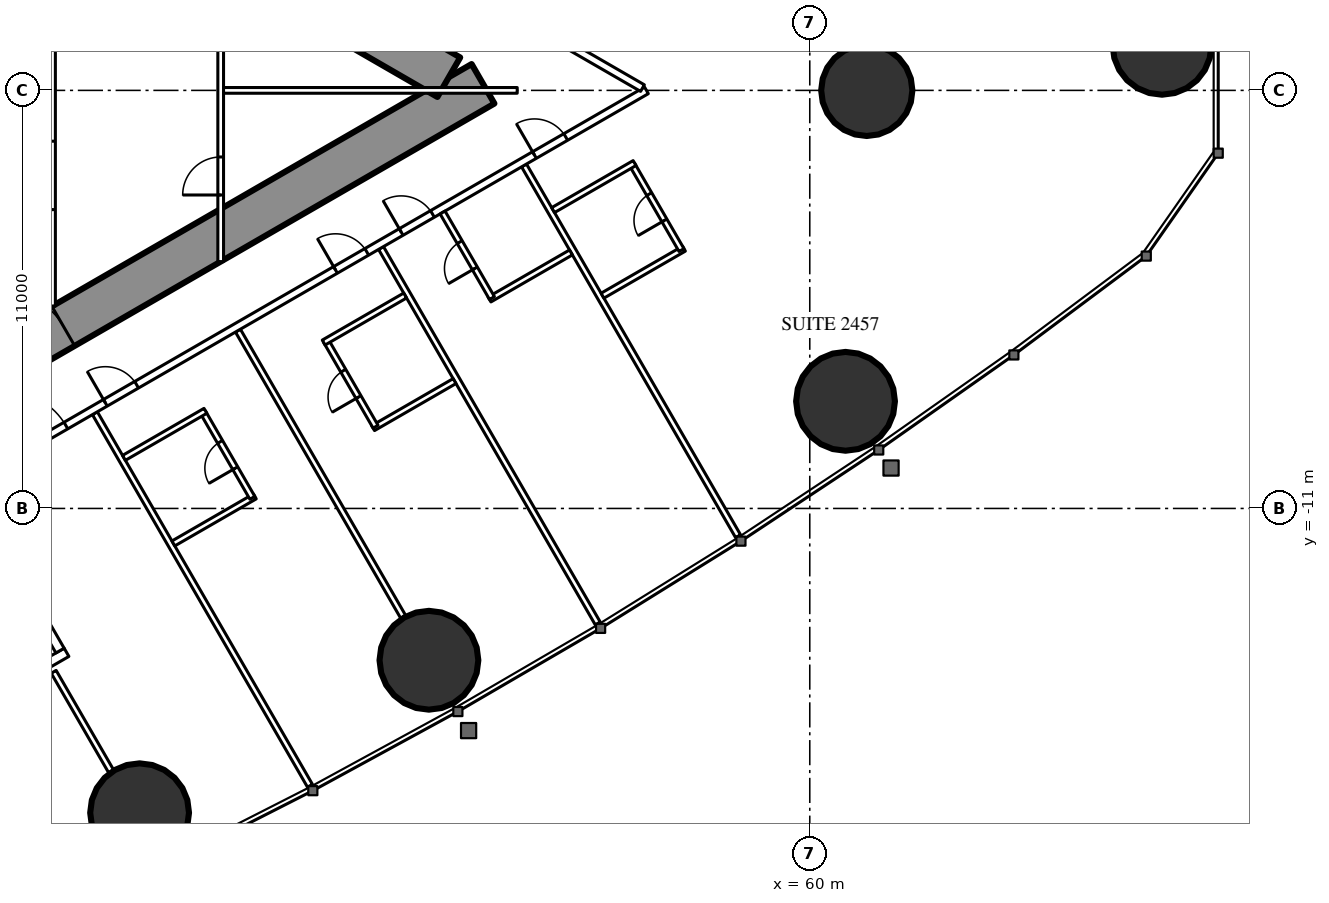
"""IFC4 building model, lengths in metres.
Left out: names, types, materials, properties, quantities, classifications, styles, units other than length and angle.
Written with IfcOpenShell. Run it as: python <this file> out.ifc"""

import sys

from ifc_helpers import new_model, si_unit, direction, frame, frame_2d, origin, origin_2d, place, context, subcontext, project, spatial, rectangle, circle, hollow_circle, extrude, element, fill, save


model = new_model("IFC4")
c1 = context("Model", 3, precision=1e-05, world=origin(), true_north=direction((0.0, 1.0)))
c2 = subcontext(c1, "Body", "Model", "MODEL_VIEW")
j1 = project(units=[si_unit("LENGTHUNIT", "METRE"), si_unit("PLANEANGLEUNIT", "RADIAN")], contexts=[c1])
p1 = place(None, origin())
s1 = spatial("IfcSite", under=j1, at=p1, CompositionType="ELEMENT")
p2 = place(p1, origin())
s2 = spatial("IfcBuilding", under=s1, at=p2, CompositionType="ELEMENT")
p3 = place(p2, frame((0.0, 0.0, 94.1)))
s3 = spatial("IfcBuildingStorey", under=s2, at=p3, CompositionType="ELEMENT", Elevation=94.1)
for number, where, z_axis, x_axis in (
    (1, (69.269, 1.187, 0.0), (0.0, 0.0, 1.0), (1.0, 0.0, 0.0)),
    (2, (42.366, -19.007, 0.0), (0.0, 0.0, 1.0), (1.0, 0.0, 0.0)),
    (3, (49.979, -14.994, 0.0), (0.0, 0.0, 1.0), (1.0, 0.0, 0.0)),
    (4, (60.941, -8.181, 0.0), (0.0, 0.0, 1.0), (1.0, 0.0, 0.0)),
):
    element("IfcColumn", number, at=place(p3, frame(where, z_axis=z_axis, x_axis=x_axis)), inside=s3, PredefinedType="COLUMN", context=c2, shape_type="SweptSolid", body=[
        extrude(hollow_circle(Radius=1.3, WallThickness=0.1, at=origin_2d()), origin(), (0.0, 0.0, 1.0), 3.5),
    ])
p4 = place(p3, frame((61.5, 0.0, 0.0), z_axis=(0.0, 0.0, 1.0), x_axis=(1.0, 0.0, 0.0)))
e5 = element("IfcColumn", 5, at=p4, inside=s3, PredefinedType="COLUMN", context=c2, shape_type="SweptSolid", body=[
    extrude(circle(Radius=1.2, at=origin_2d()), origin(), (0.0, 0.0, 1.0), 3.5),
])
p5 = place(p3, frame((27.2, -13.8, 0.0), z_axis=(0.0, 0.0, 1.0), x_axis=(0.866027159892, 0.499996958321, 0.0)))
e6 = element("IfcWall", 6, at=p5, inside=s3, PredefinedType="SHEAR", context=c2, shape_type="SweptSolid", body=[
    extrude(rectangle(XDim=27.947, YDim=1.2, at=frame_2d((13.973, 0.0))), origin(), (0.0, 0.0, 1.0), 3.5),
])
p6 = place(p5, frame((4.6, 0.0, 0.0)))
e7 = element("IfcOpeningElement", 7, at=p6, cuts=e6, PredefinedType="OPENING", context=c2, shape_type="SweptSolid", body=[
    extrude(rectangle(XDim=1.0, YDim=2.2, at=frame_2d((0.5, 1.1))), frame((0.0, 0.61, 0.0), z_axis=(0.0, -1.0, 0.0), x_axis=(1.0, 0.0, 0.0)), (0.0, 0.0, 1.0), 1.22),
])
p7 = place(p5, frame((13.395, 0.0, 0.0)))
e8 = element("IfcOpeningElement", 8, at=p7, cuts=e6, PredefinedType="OPENING", context=c2, shape_type="SweptSolid", body=[
    extrude(rectangle(XDim=1.8, YDim=2.2, at=frame_2d((0.9, 1.1))), frame((0.0, 0.61, 0.0), z_axis=(0.0, -1.0, 0.0), x_axis=(1.0, 0.0, 0.0)), (0.0, 0.0, 1.0), 1.22),
])
p8 = place(p3, frame((27.2, 13.8, 0.0), z_axis=(0.0, 0.0, 1.0), x_axis=(0.866024515034, -0.500001539357, 0.0)))
e9 = element("IfcWall", 9, at=p8, inside=s3, PredefinedType="SHEAR", context=c2, shape_type="SweptSolid", body=[
    extrude(rectangle(XDim=26.907, YDim=1.2, at=frame_2d((13.454, 0.0))), origin(), (0.0, 0.0, 1.0), 3.5),
])
p9 = place(p8, frame((4.6, 0.0, 0.0)))
e10 = element("IfcOpeningElement", 10, at=p9, cuts=e9, PredefinedType="OPENING", context=c2, shape_type="SweptSolid", body=[
    extrude(rectangle(XDim=1.0, YDim=2.2, at=frame_2d((0.5, 1.1))), frame((0.0, 0.61, 0.0), z_axis=(0.0, -1.0, 0.0), x_axis=(1.0, 0.0, 0.0)), (0.0, 0.0, 1.0), 1.22),
])
p10 = place(p8, frame((13.395, 0.0, 0.0)))
e11 = element("IfcOpeningElement", 11, at=p10, cuts=e9, PredefinedType="OPENING", context=c2, shape_type="SweptSolid", body=[
    extrude(rectangle(XDim=1.8, YDim=2.2, at=frame_2d((0.9, 1.1))), frame((0.0, 0.61, 0.0), z_axis=(0.0, -1.0, 0.0), x_axis=(1.0, 0.0, 0.0)), (0.0, 0.0, 1.0), 1.22),
])
p11 = place(p3, frame((41.19, -8.494, 0.0), z_axis=(0.0, 0.0, 1.0), x_axis=(0.49999258054, -0.866029687369, 0.0)))
e12 = element("IfcWall", 12, at=p11, inside=s3, PredefinedType="PARTITIONING", context=c2, shape_type="SweptSolid", body=[
    extrude(rectangle(XDim=11.318, YDim=0.15, at=frame_2d((5.659, 0.0))), origin(), (0.0, 0.0, 1.0), 3.25),
])
p12 = place(p3, frame((44.954, -6.321, 0.0), z_axis=(0.0, 0.0, 1.0), x_axis=(0.500018676722, -0.866014620505, 0.0)))
e13 = element("IfcWall", 13, at=p12, inside=s3, PredefinedType="PARTITIONING", context=c2, shape_type="SweptSolid", body=[
    extrude(rectangle(XDim=8.704, YDim=0.15, at=frame_2d((4.352, 0.0))), origin(), (0.0, 0.0, 1.0), 2.2),
])
p13 = place(p3, frame((48.719, -4.147, 0.0), z_axis=(0.0, 0.0, 1.0), x_axis=(0.499990498062, -0.866030889661, 0.0)))
e14 = element("IfcWall", 14, at=p13, inside=s3, PredefinedType="PARTITIONING", context=c2, shape_type="SweptSolid", body=[
    extrude(rectangle(XDim=11.406, YDim=0.15, at=frame_2d((5.703, 0.0))), origin(), (0.0, 0.0, 1.0), 3.25),
])
p14 = place(p3, frame((52.481, -1.975, 0.0), z_axis=(0.0, 0.0, 1.0), x_axis=(0.500003867771, -0.866023170714, 0.0)))
e15 = element("IfcWall", 15, at=p14, inside=s3, PredefinedType="PARTITIONING", context=c2, shape_type="SweptSolid", body=[
    extrude(rectangle(XDim=11.265, YDim=0.15, at=frame_2d((5.632, 0.0))), origin(), (0.0, 0.0, 1.0), 3.25),
])
p15 = place(p3, frame((40.105, -15.299, 0.0), z_axis=(0.0, 0.0, 1.0), x_axis=(0.499978822259, -0.866037630414, 0.0)))
e16 = element("IfcWall", 16, at=p15, inside=s3, PredefinedType="PARTITIONING", context=c2, shape_type="SweptSolid", body=[
    extrude(rectangle(XDim=3.023, YDim=0.15, at=frame_2d((1.511, 0.0))), origin(), (0.0, 0.0, 1.0), 3.25),
])
p16 = place(p3, frame((37.96, -10.243, 0.0), z_axis=(0.0, 0.0, 1.0), x_axis=(0.866026429433, 0.499998223521, 0.0)))
e17 = element("IfcWall", 17, at=p16, inside=s3, PredefinedType="PARTITIONING", context=c2, shape_type="SweptSolid", body=[
    extrude(rectangle(XDim=20.487, YDim=0.2, at=frame_2d((10.243, 0.0))), origin(), (0.0, 0.0, 1.0), 3.25),
])
p17 = place(p16, frame((4.047, 0.0, 0.0)))
e18 = element("IfcOpeningElement", 18, at=p17, cuts=e17, PredefinedType="OPENING", context=c2, shape_type="SweptSolid", body=[
    extrude(rectangle(XDim=0.95, YDim=2.2, at=frame_2d((0.475, 1.1))), frame((0.0, 0.11, 0.0), z_axis=(0.0, -1.0, 0.0), x_axis=(1.0, 0.0, 0.0)), (0.0, 0.0, 1.0), 0.22),
])
p18 = place(p16, frame((11.04, 0.0, 0.0)))
e19 = element("IfcOpeningElement", 19, at=p18, cuts=e17, PredefinedType="OPENING", context=c2, shape_type="SweptSolid", body=[
    extrude(rectangle(XDim=0.95, YDim=2.2, at=frame_2d((0.475, 1.1))), frame((0.0, 0.11, 0.0), z_axis=(0.0, -1.0, 0.0), x_axis=(1.0, 0.0, 0.0)), (0.0, 0.0, 1.0), 0.22),
])
p19 = place(p16, frame((13.035, 0.0, 0.0)))
e20 = element("IfcOpeningElement", 20, at=p19, cuts=e17, PredefinedType="OPENING", context=c2, shape_type="SweptSolid", body=[
    extrude(rectangle(XDim=0.95, YDim=2.2, at=frame_2d((0.475, 1.1))), frame((0.0, 0.11, 0.0), z_axis=(0.0, -1.0, 0.0), x_axis=(1.0, 0.0, 0.0)), (0.0, 0.0, 1.0), 0.22),
])
p20 = place(p16, frame((17.085, 0.0, 0.0)))
e21 = element("IfcOpeningElement", 21, at=p20, cuts=e17, PredefinedType="OPENING", context=c2, shape_type="SweptSolid", body=[
    extrude(rectangle(XDim=0.95, YDim=2.2, at=frame_2d((0.475, 1.1))), frame((0.0, 0.11, 0.0), z_axis=(0.0, -1.0, 0.0), x_axis=(1.0, 0.0, 0.0)), (0.0, 0.0, 1.0), 0.22),
])
p21 = place(p16, frame((1.048, 0.0, 0.0)))
e22 = element("IfcOpeningElement", 22, at=p21, cuts=e17, PredefinedType="OPENING", context=c2, shape_type="SweptSolid", body=[
    extrude(rectangle(XDim=1.8, YDim=2.2, at=frame_2d((0.9, 1.1))), frame((0.0, 0.11, 0.0), z_axis=(0.0, -1.0, 0.0), x_axis=(1.0, 0.0, 0.0)), (0.0, 0.0, 1.0), 0.22),
])
p22 = place(p3, frame((36.834, 10.894, 0.0), z_axis=(0.0, 0.0, 1.0), x_axis=(0.866028157229, -0.499995230863, 0.0)))
e23 = element("IfcWall", 23, at=p22, inside=s3, PredefinedType="PARTITIONING", context=c2, shape_type="SweptSolid", body=[
    extrude(rectangle(XDim=21.667, YDim=0.2, at=frame_2d((10.833, 0.0))), origin(), (0.0, 0.0, 1.0), 3.25),
])
p23 = place(p22, frame((14.04, 0.0, 0.0)))
e24 = element("IfcOpeningElement", 24, at=p23, cuts=e23, PredefinedType="OPENING", context=c2, shape_type="SweptSolid", body=[
    extrude(rectangle(XDim=0.95, YDim=2.2, at=frame_2d((0.475, 1.1))), frame((0.0, 0.11, 0.0), z_axis=(0.0, -1.0, 0.0), x_axis=(1.0, 0.0, 0.0)), (0.0, 0.0, 1.0), 0.22),
])
p24 = place(p22, frame((9.99, 0.0, 0.0)))
e25 = element("IfcOpeningElement", 25, at=p24, cuts=e23, PredefinedType="OPENING", context=c2, shape_type="SweptSolid", body=[
    extrude(rectangle(XDim=0.95, YDim=2.2, at=frame_2d((0.475, 1.1))), frame((0.0, 0.11, 0.0), z_axis=(0.0, -1.0, 0.0), x_axis=(1.0, 0.0, 0.0)), (0.0, 0.0, 1.0), 0.22),
])
p25 = place(p22, frame((3.35, 0.0, 0.0)))
e26 = element("IfcOpeningElement", 26, at=p25, cuts=e23, PredefinedType="OPENING", context=c2, shape_type="SweptSolid", body=[
    extrude(rectangle(XDim=1.0, YDim=2.2, at=frame_2d((0.5, 1.1))), frame((0.0, 0.11, 0.0), z_axis=(0.0, -1.0, 0.0), x_axis=(1.0, 0.0, 0.0)), (0.0, 0.0, 1.0), 0.22),
])
p26 = place(p3, frame((43.255, -11.921, 0.0), z_axis=(0.0, 0.0, 1.0), x_axis=(0.866006523861, 0.500032699561, 0.0)))
e27 = element("IfcWall", 27, at=p26, inside=s3, PredefinedType="PARTITIONING", context=c2, shape_type="SweptSolid", body=[
    extrude(rectangle(XDim=2.475, YDim=0.15, at=frame_2d((1.237, 0.0))), origin(), (0.0, 0.0, 1.0), 3.25),
])
p27 = place(p3, frame((44.033, -8.469, 0.0), z_axis=(0.0, 0.0, 1.0), x_axis=(0.500047596559, -0.865997922154, 0.0)))
e28 = element("IfcWall", 28, at=p27, inside=s3, PredefinedType="PARTITIONING", context=c2, shape_type="SweptSolid", body=[
    extrude(rectangle(XDim=2.6, YDim=0.15, at=frame_2d((1.3, 0.0))), origin(), (0.0, 0.0, 1.0), 3.25),
])
p28 = place(p27, frame((0.9, 0.0, 0.0)))
e29 = element("IfcOpeningElement", 29, at=p28, cuts=e28, PredefinedType="OPENING", context=c2, shape_type="SweptSolid", body=[
    extrude(rectangle(XDim=0.8, YDim=2.2, at=frame_2d((0.4, 1.1))), frame((0.0, 0.085, 0.0), z_axis=(0.0, -1.0, 0.0), x_axis=(1.0, 0.0, 0.0)), (0.0, 0.0, 1.0), 0.17),
])
p29 = place(p3, frame((41.955, -9.669, 0.0), z_axis=(0.0, 0.0, 1.0), x_axis=(0.866006523861, 0.500032699561, 0.0)))
e30 = element("IfcWall", 30, at=p29, inside=s3, PredefinedType="PARTITIONING", context=c2, shape_type="SweptSolid", body=[
    extrude(rectangle(XDim=2.475, YDim=0.15, at=frame_2d((1.237, 0.0))), origin(), (0.0, 0.0, 1.0), 3.25),
])
p30 = place(p3, frame((48.51, -8.887, 0.0), z_axis=(0.0, 0.0, 1.0), x_axis=(0.866031185235, 0.4999899861, 0.0)))
e31 = element("IfcWall", 31, at=p30, inside=s3, PredefinedType="PARTITIONING", context=c2, shape_type="SweptSolid", body=[
    extrude(rectangle(XDim=2.475, YDim=0.15, at=frame_2d((1.238, 0.0))), origin(), (0.0, 0.0, 1.0), 3.25),
])
p31 = place(p3, frame((47.275, -6.597, 0.0), z_axis=(0.0, 0.0, 1.0), x_axis=(0.499936506574, -0.866062058628, 0.0)))
e32 = element("IfcWall", 32, at=p31, inside=s3, PredefinedType="PARTITIONING", context=c2, shape_type="SweptSolid", body=[
    extrude(rectangle(XDim=2.6, YDim=0.15, at=frame_2d((1.3, 0.0))), origin(), (0.0, 0.0, 1.0), 3.25),
])
p32 = place(p31, frame((0.9, 0.0, 0.0)))
e33 = element("IfcOpeningElement", 33, at=p32, cuts=e32, PredefinedType="OPENING", context=c2, shape_type="SweptSolid", body=[
    extrude(rectangle(XDim=0.8, YDim=2.2, at=frame_2d((0.4, 1.1))), frame((0.0, 0.085, 0.0), z_axis=(0.0, -1.0, 0.0), x_axis=(1.0, 0.0, 0.0)), (0.0, 0.0, 1.0), 0.17),
])
for number, where, z_axis, x_axis in (
    (34, (47.21, -6.635, 0.0), (0.0, 0.0, 1.0), (0.866, 0.5, 0.0)),
    (35, (51.573, -5.502, 0.0), (0.0, 0.0, 1.0), (0.866, 0.5, 0.0)),
):
    element("IfcWall", number, at=place(p3, frame(where, z_axis=z_axis, x_axis=x_axis)), inside=s3, PredefinedType="PARTITIONING", context=c2, shape_type="SweptSolid", body=[
        extrude(rectangle(XDim=2.475, YDim=0.15, at=frame_2d((1.237, 0.0))), origin(), (0.0, 0.0, 1.0), 3.25),
    ])
p33 = place(p3, frame((50.338, -3.213, 0.0), z_axis=(0.0, 0.0, 1.0), x_axis=(0.500047596559, -0.865997922154, 0.0)))
e36 = element("IfcWall", 36, at=p33, inside=s3, PredefinedType="PARTITIONING", context=c2, shape_type="SweptSolid", body=[
    extrude(rectangle(XDim=2.6, YDim=0.15, at=frame_2d((1.3, 0.0))), origin(), (0.0, 0.0, 1.0), 3.25),
])
p34 = place(p33, frame((0.9, 0.0, 0.0)))
e37 = element("IfcOpeningElement", 37, at=p34, cuts=e36, PredefinedType="OPENING", context=c2, shape_type="SweptSolid", body=[
    extrude(rectangle(XDim=0.8, YDim=2.2, at=frame_2d((0.4, 1.1))), frame((0.0, 0.085, 0.0), z_axis=(0.0, -1.0, 0.0), x_axis=(1.0, 0.0, 0.0)), (0.0, 0.0, 1.0), 0.17),
])
p35 = place(p3, frame((54.546, -5.402, 0.0), z_axis=(0.0, 0.0, 1.0), x_axis=(0.866006523861, 0.500032699561, 0.0)))
e38 = element("IfcWall", 38, at=p35, inside=s3, PredefinedType="PARTITIONING", context=c2, shape_type="SweptSolid", body=[
    extrude(rectangle(XDim=2.475, YDim=0.15, at=frame_2d((1.237, 0.0))), origin(), (0.0, 0.0, 1.0), 3.25),
])
p36 = place(p3, frame((55.325, -1.95, 0.0), z_axis=(0.0, 0.0, 1.0), x_axis=(0.500006934395, -0.866021400173, 0.0)))
e39 = element("IfcWall", 39, at=p36, inside=s3, PredefinedType="PARTITIONING", context=c2, shape_type="SweptSolid", body=[
    extrude(rectangle(XDim=2.6, YDim=0.15, at=frame_2d((1.3, 0.0))), origin(), (0.0, 0.0, 1.0), 3.25),
])
p37 = place(p36, frame((0.9, 0.0, 0.0)))
e40 = element("IfcOpeningElement", 40, at=p37, cuts=e39, PredefinedType="OPENING", context=c2, shape_type="SweptSolid", body=[
    extrude(rectangle(XDim=0.8, YDim=2.2, at=frame_2d((0.4, 1.1))), frame((0.0, 0.085, 0.0), z_axis=(0.0, -1.0, 0.0), x_axis=(1.0, 0.0, 0.0)), (0.0, 0.0, 1.0), 0.17),
])
p38 = place(p3, frame((53.246, -3.15, 0.0), z_axis=(0.0, 0.0, 1.0), x_axis=(0.866006523861, 0.500032699561, 0.0)))
e41 = element("IfcWall", 41, at=p38, inside=s3, PredefinedType="PARTITIONING", context=c2, shape_type="SweptSolid", body=[
    extrude(rectangle(XDim=2.475, YDim=0.15, at=frame_2d((1.237, 0.0))), origin(), (0.0, 0.0, 1.0), 3.25),
])
p39 = place(p3, frame((40.075, -5.674, 0.0), z_axis=(0.0, 0.0, 1.0), x_axis=(0.0, 1.0, 0.0)))
e42 = element("IfcWall", 42, at=p39, inside=s3, PredefinedType="PARTITIONING", context=c2, shape_type="SweptSolid", body=[
    extrude(rectangle(XDim=6.874, YDim=0.15, at=frame_2d((3.437, 0.0))), origin(), (0.0, 0.0, 1.0), 3.25),
])
p40 = place(p39, frame((2.537, 0.0, 0.0)))
e43 = element("IfcOpeningElement", 43, at=p40, cuts=e42, PredefinedType="OPENING", context=c2, shape_type="SweptSolid", body=[
    extrude(rectangle(XDim=1.8, YDim=2.2, at=frame_2d((0.9, 1.1))), frame((0.0, 0.085, 0.0), z_axis=(0.0, -1.0, 0.0), x_axis=(1.0, 0.0, 0.0)), (0.0, 0.0, 1.0), 0.17),
])
p41 = place(p3, frame((44.5, -4.505, 0.0), z_axis=(0.0, 0.0, 1.0), x_axis=(0.0, 1.0, 0.0)))
e44 = element("IfcWall", 44, at=p41, inside=s3, PredefinedType="PARTITIONING", context=c2, shape_type="SweptSolid", body=[
    extrude(rectangle(XDim=9.009, YDim=0.15, at=frame_2d((4.505, 0.0))), origin(), (0.0, 0.0, 1.0), 2.45),
])
p42 = place(p41, frame((1.752, 0.0, 0.0)))
e45 = element("IfcOpeningElement", 45, at=p42, cuts=e44, PredefinedType="OPENING", context=c2, shape_type="SweptSolid", body=[
    extrude(rectangle(XDim=1.0, YDim=2.2, at=frame_2d((0.5, 1.1))), frame((0.0, 0.085, 0.0), z_axis=(0.0, -1.0, 0.0), x_axis=(1.0, 0.0, 0.0)), (0.0, 0.0, 1.0), 0.17),
])
p43 = place(p41, frame((6.257, 0.0, 0.0)))
e46 = element("IfcOpeningElement", 46, at=p43, cuts=e44, PredefinedType="OPENING", context=c2, shape_type="SweptSolid", body=[
    extrude(rectangle(XDim=1.0, YDim=2.2, at=frame_2d((0.5, 1.1))), frame((0.0, 0.085, 0.0), z_axis=(0.0, -1.0, 0.0), x_axis=(1.0, 0.0, 0.0)), (0.0, 0.0, 1.0), 0.17),
])
p44 = place(p3, frame((44.575, 0.0, 0.0), z_axis=(0.0, 0.0, 1.0), x_axis=(1.0, 0.0, 0.0)))
e47 = element("IfcWall", 47, at=p44, inside=s3, PredefinedType="PARTITIONING", context=c2, shape_type="SweptSolid", body=[
    extrude(rectangle(XDim=7.727, YDim=0.15, at=frame_2d((3.864, 0.0))), origin(), (0.0, 0.0, 1.0), 2.2),
])
p45 = place(p3, frame((32.996, -19.086, 0.0), z_axis=(0.0, 0.0, 1.0), x_axis=(0.866028165386, 0.499995216735, 0.0)))
e48 = element("IfcWall", 48, at=p45, inside=s3, PredefinedType="PARTITIONING", context=c2, shape_type="SweptSolid", body=[
    extrude(rectangle(XDim=8.6, YDim=0.25, at=frame_2d((4.3, 0.0))), origin(), (0.0, 0.0, 1.0), 3.25),
])
p46 = place(p3, frame((38.673, -11.968, 0.0), z_axis=(0.0, 0.0, 1.0), x_axis=(0.499929347863, -0.866066190972, 0.0)))
e49 = element("IfcWall", 49, at=p46, inside=s3, PredefinedType="PARTITIONING", context=c2, shape_type="SweptSolid", body=[
    extrude(rectangle(XDim=3.201, YDim=0.25, at=frame_2d((1.6, 0.0))), origin(), (0.0, 0.0, 1.0), 3.25),
])
p47 = place(p28, origin())
e50 = element("IfcDoor", 50, at=p47, inside=s3, OperationType="SINGLE_SWING_RIGHT", PredefinedType="DOOR", context=c2, shape_type="SweptSolid", body=[
    extrude(rectangle(XDim=0.8, YDim=2.2, at=frame_2d((0.4, 1.1))), frame((0.0, 0.025, 0.0), z_axis=(0.0, -1.0, 0.0), x_axis=(1.0, 0.0, 0.0)), (0.0, 0.0, 1.0), 0.05),
])
fill(e29, e50)
p48 = place(p17, origin())
e51 = element("IfcDoor", 51, at=p48, inside=s3, OperationType="SINGLE_SWING_LEFT", PredefinedType="DOOR", context=c2, shape_type="SweptSolid", body=[
    extrude(rectangle(XDim=0.95, YDim=2.2, at=frame_2d((0.475, 1.1))), frame((0.0, 0.025, 0.0), z_axis=(0.0, -1.0, 0.0), x_axis=(1.0, 0.0, 0.0)), (0.0, 0.0, 1.0), 0.05),
])
fill(e18, e51)
p49 = place(p32, origin())
e52 = element("IfcDoor", 52, at=p49, inside=s3, OperationType="SINGLE_SWING_RIGHT", PredefinedType="DOOR", context=c2, shape_type="SweptSolid", body=[
    extrude(rectangle(XDim=0.8, YDim=2.2, at=frame_2d((0.4, 1.1))), frame((0.0, 0.025, 0.0), z_axis=(0.0, -1.0, 0.0), x_axis=(1.0, 0.0, 0.0)), (0.0, 0.0, 1.0), 0.05),
])
fill(e33, e52)
p50 = place(p18, origin())
e53 = element("IfcDoor", 53, at=p50, inside=s3, OperationType="SINGLE_SWING_LEFT", PredefinedType="DOOR", context=c2, shape_type="SweptSolid", body=[
    extrude(rectangle(XDim=0.95, YDim=2.2, at=frame_2d((0.475, 1.1))), frame((0.0, 0.025, 0.0), z_axis=(0.0, -1.0, 0.0), x_axis=(1.0, 0.0, 0.0)), (0.0, 0.0, 1.0), 0.05),
])
fill(e19, e53)
p51 = place(p34, origin())
e54 = element("IfcDoor", 54, at=p51, inside=s3, OperationType="SINGLE_SWING_RIGHT", PredefinedType="DOOR", context=c2, shape_type="SweptSolid", body=[
    extrude(rectangle(XDim=0.8, YDim=2.2, at=frame_2d((0.4, 1.1))), frame((0.0, 0.025, 0.0), z_axis=(0.0, -1.0, 0.0), x_axis=(1.0, 0.0, 0.0)), (0.0, 0.0, 1.0), 0.05),
])
fill(e37, e54)
p52 = place(p19, origin())
e55 = element("IfcDoor", 55, at=p52, inside=s3, OperationType="SINGLE_SWING_LEFT", PredefinedType="DOOR", context=c2, shape_type="SweptSolid", body=[
    extrude(rectangle(XDim=0.95, YDim=2.2, at=frame_2d((0.475, 1.1))), frame((0.0, 0.025, 0.0), z_axis=(0.0, -1.0, 0.0), x_axis=(1.0, 0.0, 0.0)), (0.0, 0.0, 1.0), 0.05),
])
fill(e20, e55)
p53 = place(p37, origin())
e56 = element("IfcDoor", 56, at=p53, inside=s3, OperationType="SINGLE_SWING_RIGHT", PredefinedType="DOOR", context=c2, shape_type="SweptSolid", body=[
    extrude(rectangle(XDim=0.8, YDim=2.2, at=frame_2d((0.4, 1.1))), frame((0.0, 0.025, 0.0), z_axis=(0.0, -1.0, 0.0), x_axis=(1.0, 0.0, 0.0)), (0.0, 0.0, 1.0), 0.05),
])
fill(e40, e56)
p54 = place(p20, origin())
e57 = element("IfcDoor", 57, at=p54, inside=s3, OperationType="SINGLE_SWING_LEFT", PredefinedType="DOOR", context=c2, shape_type="SweptSolid", body=[
    extrude(rectangle(XDim=0.95, YDim=2.2, at=frame_2d((0.475, 1.1))), frame((0.0, 0.025, 0.0), z_axis=(0.0, -1.0, 0.0), x_axis=(1.0, 0.0, 0.0)), (0.0, 0.0, 1.0), 0.05),
])
fill(e21, e57)
p55 = place(p21, origin())
e58 = element("IfcDoor", 58, at=p55, inside=s3, OperationType="DOUBLE_DOOR_SINGLE_SWING", PredefinedType="DOOR", context=c2, shape_type="SweptSolid", body=[
    extrude(rectangle(XDim=1.8, YDim=2.2, at=frame_2d((0.9, 1.1))), frame((0.0, 0.025, 0.0), z_axis=(0.0, -1.0, 0.0), x_axis=(1.0, 0.0, 0.0)), (0.0, 0.0, 1.0), 0.05),
])
fill(e22, e58)
p56 = place(p40, origin())
e59 = element("IfcDoor", 59, at=p56, inside=s3, OperationType="DOUBLE_DOOR_SINGLE_SWING", PredefinedType="DOOR", context=c2, shape_type="SweptSolid", body=[
    extrude(rectangle(XDim=1.8, YDim=2.2, at=frame_2d((0.9, 1.1))), frame((0.0, 0.025, 0.0), z_axis=(0.0, -1.0, 0.0), x_axis=(1.0, 0.0, 0.0)), (0.0, 0.0, 1.0), 0.05),
])
fill(e43, e59)
p57 = place(p42, origin())
e60 = element("IfcDoor", 60, at=p57, inside=s3, OperationType="SINGLE_SWING_LEFT", PredefinedType="DOOR", context=c2, shape_type="SweptSolid", body=[
    extrude(rectangle(XDim=1.0, YDim=2.2, at=frame_2d((0.5, 1.1))), frame((0.0, 0.025, 0.0), z_axis=(0.0, -1.0, 0.0), x_axis=(1.0, 0.0, 0.0)), (0.0, 0.0, 1.0), 0.05),
])
fill(e45, e60)
p58 = place(p7, origin())
e61 = element("IfcDoor", 61, at=p58, inside=s3, OperationType="DOUBLE_DOOR_SINGLE_SWING", PredefinedType="DOOR", context=c2, shape_type="SweptSolid", body=[
    extrude(rectangle(XDim=1.8, YDim=2.2, at=frame_2d((0.9, 1.1))), frame((0.0, 0.025, 0.0), z_axis=(0.0, -1.0, 0.0), x_axis=(1.0, 0.0, 0.0)), (0.0, 0.0, 1.0), 0.05),
])
fill(e8, e61)
save(model, sys.argv[1])
